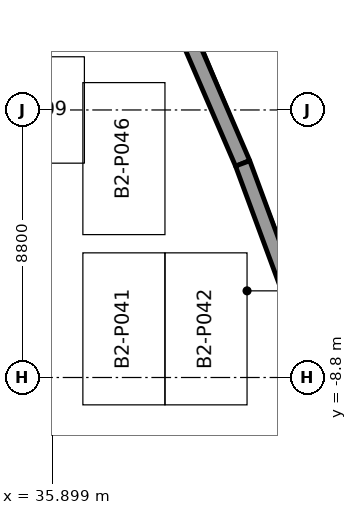
"""IFC4 building model, lengths in metres.
Left out: names, types, materials, properties, quantities, classifications, styles, units other than length and angle.
Written with IfcOpenShell. Run it as: python <this file> out.ifc"""

import sys

from ifc_helpers import new_model, si_unit, direction, frame, frame_2d, origin, place, context, subcontext, project, spatial, rectangle, extrude, element, save


model = new_model("IFC4")
c1 = context("Model", 3, precision=1e-05, world=origin(), true_north=direction((0.0, 1.0)))
c2 = subcontext(c1, "Body", "Model", "MODEL_VIEW")
j1 = project(units=[si_unit("LENGTHUNIT", "METRE"), si_unit("PLANEANGLEUNIT", "RADIAN")], contexts=[c1])
p1 = place(None, origin())
s1 = spatial("IfcSite", under=j1, at=p1, CompositionType="ELEMENT")
p2 = place(p1, origin())
s2 = spatial("IfcBuilding", under=s1, at=p2, CompositionType="ELEMENT")
p3 = place(p2, frame((0.0, 0.0, -9.0)))
s3 = spatial("IfcBuildingStorey", under=s2, at=p3, CompositionType="ELEMENT", Elevation=-9.0)
p4 = place(p3, frame((38.768, 6.09, 0.0), z_axis=(0.0, 0.0, 1.0), x_axis=(0.396224264914, -0.918153762664, 0.0)))
e1 = element("IfcWall", 1, at=p4, inside=s3, PredefinedType="SOLIDWALL", context=c2, shape_type="SweptSolid", body=[
    extrude(rectangle(XDim=8.547, YDim=0.5, at=frame_2d((4.274, 0.0))), origin(), (0.0, 0.0, 1.0), 4.5),
])
p5 = place(p3, frame((42.155, -1.758, 0.0), z_axis=(0.0, 0.0, 1.0), x_axis=(0.346876937077, -0.937910651674, 0.0)))
e2 = element("IfcWall", 2, at=p5, inside=s3, PredefinedType="SOLIDWALL", context=c2, shape_type="SweptSolid", body=[
    extrude(rectangle(XDim=8.235, YDim=0.5, at=frame_2d((4.118, 0.0))), origin(), (0.0, 0.0, 1.0), 4.5),
])
save(model, sys.argv[1])
